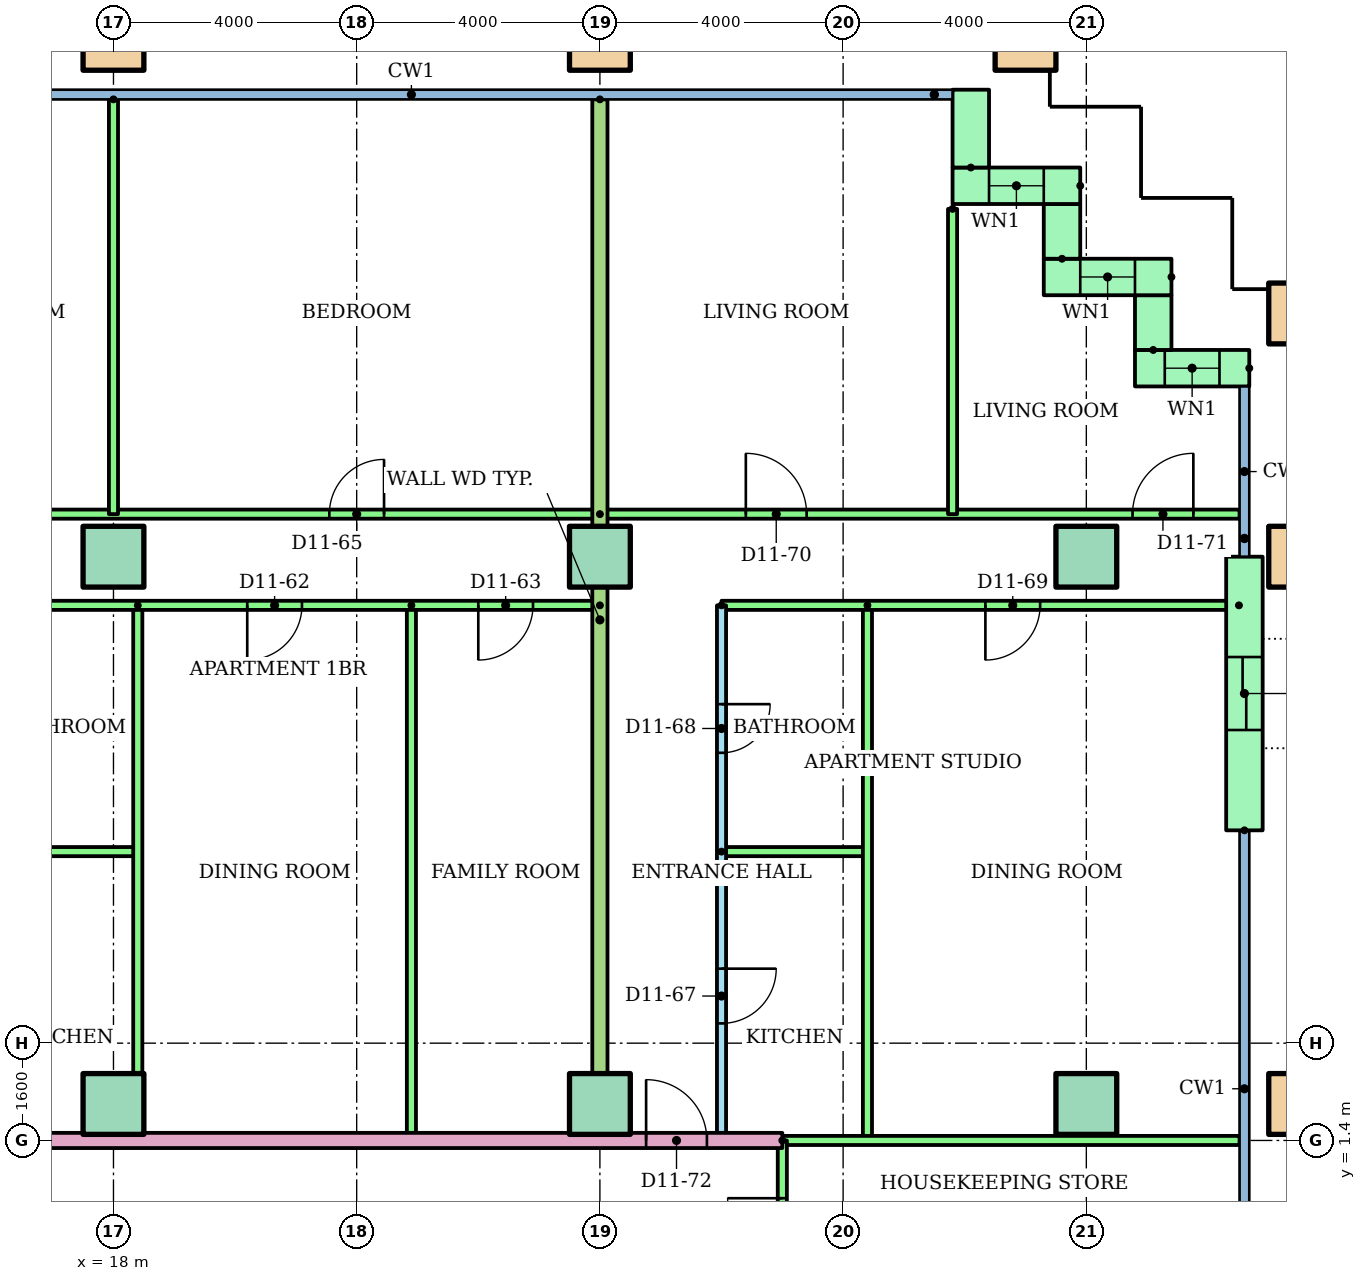
"""IFC4 building model, lengths in metres.
Left out: names, types, materials, properties, quantities, classifications, styles, units other than length and angle.
Written with IfcOpenShell. Run it as: python <this file> out.ifc"""

import sys

from ifc_helpers import new_model, si_unit, direction, frame, frame_2d, origin, origin_2d, place, context, subcontext, project, spatial, rectangle, hollow_rectangle, extrude, element, fill, save


model = new_model("IFC4")
c1 = context("Model", 3, precision=1e-05, world=origin(), true_north=direction((0.0, 1.0)))
c2 = subcontext(c1, "Body", "Model", "MODEL_VIEW")
j1 = project(units=[si_unit("LENGTHUNIT", "METRE"), si_unit("PLANEANGLEUNIT", "RADIAN")], contexts=[c1])
p1 = place(None, origin())
s1 = spatial("IfcSite", under=j1, at=p1, CompositionType="ELEMENT")
p2 = place(p1, origin())
s2 = spatial("IfcBuilding", under=s1, at=p2, CompositionType="ELEMENT")
p3 = place(p2, frame((0.0, 0.0, 44.8)))
s3 = spatial("IfcBuildingStorey", under=s2, at=p3, CompositionType="ELEMENT", Elevation=44.8)
for number, where in (
    (1, (18.0, 2.0, 0.0)),
    (2, (26.0, 2.0, 0.0)),
    (3, (34.0, 2.0, 0.0)),
):
    element("IfcColumn", number, at=place(p3, frame(where)), inside=s3, PredefinedType="COLUMN", context=c2, shape_type="SweptSolid", body=[
        extrude(rectangle(XDim=1.0, YDim=1.0, at=origin_2d()), origin(), (0.0, 0.0, 1.0), 3.2),
    ])
p4 = place(p3, frame((37.5, 2.0, 0.0)))
e4 = element("IfcColumn", 4, at=p4, inside=s3, PredefinedType="COLUMN", context=c2, shape_type="SweptSolid", body=[
    extrude(hollow_rectangle(XDim=1.0, YDim=1.0, WallThickness=0.05, at=origin_2d()), origin(), (0.0, 0.0, 1.0), 3.2),
])
for number, where in (
    (5, (18.0, 11.0, 0.0)),
    (6, (26.0, 11.0, 0.0)),
    (7, (34.0, 11.0, 0.0)),
):
    element("IfcColumn", number, at=place(p3, frame(where)), inside=s3, PredefinedType="COLUMN", context=c2, shape_type="SweptSolid", body=[
        extrude(rectangle(XDim=1.0, YDim=1.0, at=origin_2d()), origin(), (0.0, 0.0, 1.0), 3.2),
    ])
for number, where in (
    (8, (37.5, 11.0, 0.0)),
    (9, (37.5, 15.0, 0.0)),
    (10, (18.0, 19.5, 0.0)),
    (11, (26.0, 19.5, 0.0)),
    (12, (33.0, 19.5, 0.0)),
):
    element("IfcColumn", number, at=place(p3, frame(where)), inside=s3, PredefinedType="COLUMN", context=c2, shape_type="SweptSolid", body=[
        extrude(hollow_rectangle(XDim=1.0, YDim=1.0, WallThickness=0.05, at=origin_2d()), origin(), (0.0, 0.0, 1.0), 3.2),
    ])
p5 = place(p3, frame((36.68, 14.1, 0.0), z_axis=(0.0, 0.0, 1.0), x_axis=(-1.0, 0.0, 0.0)))
e13 = element("IfcWall", 13, at=p5, inside=s3, PredefinedType="STANDARD", context=c2, shape_type="SweptSolid", body=[
    extrude(rectangle(XDim=1.88, YDim=0.6, at=frame_2d((0.94, 0.0))), origin(), (0.0, 0.0, 1.0), 2.92),
])
p6 = place(p5, frame((0.49, 0.0, 0.9)))
e14 = element("IfcOpeningElement", 14, at=p6, cuts=e13, PredefinedType="OPENING", context=c2, shape_type="SweptSolid", body=[
    extrude(rectangle(XDim=0.9, YDim=1.5, at=frame_2d((0.45, 0.75))), frame((0.0, 0.31, 0.0), z_axis=(0.0, -1.0, 0.0), x_axis=(1.0, 0.0, 0.0)), (0.0, 0.0, 1.0), 0.62),
])
p7 = place(p3, frame((35.1, 14.4, 0.0), z_axis=(0.0, 0.0, 1.0), x_axis=(0.0, 1.0, 0.0)))
e15 = element("IfcWall", 15, at=p7, inside=s3, PredefinedType="STANDARD", context=c2, shape_type="SweptSolid", body=[
    extrude(rectangle(XDim=0.9, YDim=0.6, at=frame_2d((0.45, 0.0))), origin(), (0.0, 0.0, 1.0), 2.92),
])
p8 = place(p3, frame((35.4, 15.6, 0.0), z_axis=(0.0, 0.0, 1.0), x_axis=(-1.0, 0.0, 0.0)))
e16 = element("IfcWall", 16, at=p8, inside=s3, PredefinedType="STANDARD", context=c2, shape_type="SweptSolid", body=[
    extrude(rectangle(XDim=2.1, YDim=0.6, at=frame_2d((1.05, 0.0))), origin(), (0.0, 0.0, 1.0), 2.92),
])
p9 = place(p8, frame((0.6, 0.0, 0.9)))
e17 = element("IfcOpeningElement", 17, at=p9, cuts=e16, PredefinedType="OPENING", context=c2, shape_type="SweptSolid", body=[
    extrude(rectangle(XDim=0.9, YDim=1.5, at=frame_2d((0.45, 0.75))), frame((0.0, 0.31, 0.0), z_axis=(0.0, -1.0, 0.0), x_axis=(1.0, 0.0, 0.0)), (0.0, 0.0, 1.0), 0.62),
])
p10 = place(p3, frame((33.6, 15.9, 0.0), z_axis=(0.0, 0.0, 1.0), x_axis=(0.0, 1.0, 0.0)))
e18 = element("IfcWall", 18, at=p10, inside=s3, PredefinedType="STANDARD", context=c2, shape_type="SweptSolid", body=[
    extrude(rectangle(XDim=0.9, YDim=0.6, at=frame_2d((0.45, 0.0))), origin(), (0.0, 0.0, 1.0), 2.92),
])
p11 = place(p3, frame((33.9, 17.1, 0.0), z_axis=(0.0, 0.0, 1.0), x_axis=(-1.0, 0.0, 0.0)))
e19 = element("IfcWall", 19, at=p11, inside=s3, PredefinedType="STANDARD", context=c2, shape_type="SweptSolid", body=[
    extrude(rectangle(XDim=2.1, YDim=0.6, at=frame_2d((1.05, 0.0))), origin(), (0.0, 0.0, 1.0), 2.92),
])
p12 = place(p11, frame((0.6, 0.0, 0.9)))
e20 = element("IfcOpeningElement", 20, at=p12, cuts=e19, PredefinedType="OPENING", context=c2, shape_type="SweptSolid", body=[
    extrude(rectangle(XDim=0.9, YDim=1.5, at=frame_2d((0.45, 0.75))), frame((0.0, 0.31, 0.0), z_axis=(0.0, -1.0, 0.0), x_axis=(1.0, 0.0, 0.0)), (0.0, 0.0, 1.0), 0.62),
])
p13 = place(p3, frame((32.1, 17.4, 0.0), z_axis=(0.0, 0.0, 1.0), x_axis=(0.0, 1.0, 0.0)))
e21 = element("IfcWall", 21, at=p13, inside=s3, PredefinedType="STANDARD", context=c2, shape_type="SweptSolid", body=[
    extrude(rectangle(XDim=1.28, YDim=0.6, at=frame_2d((0.64, 0.0))), origin(), (0.0, 0.0, 1.0), 2.92),
])
p14 = place(p3, frame((36.6, 6.5, 0.0), z_axis=(0.0, 0.0, 1.0), x_axis=(0.0, 1.0, 0.0)))
e22 = element("IfcWall", 22, at=p14, inside=s3, PredefinedType="STANDARD", context=c2, shape_type="SweptSolid", body=[
    extrude(rectangle(XDim=4.5, YDim=0.6, at=frame_2d((2.25, 0.0))), origin(), (0.0, 0.0, 1.0), 2.92),
])
p15 = place(p14, frame((1.65, 0.0, 0.0)))
e23 = element("IfcOpeningElement", 23, at=p15, cuts=e22, PredefinedType="OPENING", context=c2, shape_type="SweptSolid", body=[
    extrude(rectangle(XDim=1.2, YDim=2.1, at=frame_2d((0.6, 1.05))), frame((0.0, 0.31, 0.0), z_axis=(0.0, -1.0, 0.0), x_axis=(1.0, 0.0, 0.0)), (0.0, 0.0, 1.0), 0.62),
])
p16 = place(p3, frame((16.0, 6.15, 0.0)))
e24 = element("IfcWall", 24, at=p16, inside=s3, PredefinedType="PARTITIONING", context=c2, shape_type="SweptSolid", body=[
    extrude(rectangle(XDim=2.4, YDim=0.15, at=frame_2d((1.2, 0.0))), origin(), (0.0, 0.0, 1.0), 2.4),
])
for number, where, z_axis, x_axis in (
    (25, (18.4, 10.2, 0.0), (0.0, 0.0, 1.0), (0.0, -1.0, 0.0)),
    (26, (22.9, 10.2, 0.0), (0.0, 0.0, 1.0), (0.0, -1.0, 0.0)),
):
    element("IfcWall", number, at=place(p3, frame(where, z_axis=z_axis, x_axis=x_axis)), inside=s3, PredefinedType="PARTITIONING", context=c2, shape_type="SweptSolid", body=[
        extrude(rectangle(XDim=8.8, YDim=0.15, at=frame_2d((4.4, 0.0))), origin(), (0.0, 0.0, 1.0), 2.4),
    ])
p17 = place(p3, frame((26.0, 10.2, 0.0), z_axis=(0.0, 0.0, 1.0), x_axis=(-1.0, 0.0, 0.0)))
e27 = element("IfcWall", 27, at=p17, inside=s3, PredefinedType="PARTITIONING", context=c2, shape_type="SweptSolid", body=[
    extrude(rectangle(XDim=10.0, YDim=0.15, at=frame_2d((5.0, 0.0))), origin(), (0.0, 0.0, 1.0), 2.4),
])
p18 = place(p17, frame((4.9, 0.0, 0.0)))
e28 = element("IfcOpeningElement", 28, at=p18, cuts=e27, PredefinedType="OPENING", context=c2, shape_type="SweptSolid", body=[
    extrude(rectangle(XDim=0.9, YDim=2.1, at=frame_2d((0.45, 1.05))), frame((0.0, 0.085, 0.0), z_axis=(0.0, -1.0, 0.0), x_axis=(1.0, 0.0, 0.0)), (0.0, 0.0, 1.0), 0.17),
])
p19 = place(p17, frame((1.1, 0.0, 0.0)))
e29 = element("IfcOpeningElement", 29, at=p19, cuts=e27, PredefinedType="OPENING", context=c2, shape_type="SweptSolid", body=[
    extrude(rectangle(XDim=0.9, YDim=2.1, at=frame_2d((0.45, 1.05))), frame((0.0, 0.085, 0.0), z_axis=(0.0, -1.0, 0.0), x_axis=(1.0, 0.0, 0.0)), (0.0, 0.0, 1.0), 0.17),
])
p20 = place(p3, frame((14.0, 11.7, 0.0)))
e30 = element("IfcWall", 30, at=p20, inside=s3, PredefinedType="PARTITIONING", context=c2, shape_type="SweptSolid", body=[
    extrude(rectangle(XDim=12.0, YDim=0.15, at=frame_2d((6.0, 0.0))), origin(), (0.0, 0.0, 1.0), 2.4),
])
p21 = place(p20, frame((1.5, 0.0, 0.0)))
e31 = element("IfcOpeningElement", 31, at=p21, cuts=e30, PredefinedType="OPENING", context=c2, shape_type="SweptSolid", body=[
    extrude(rectangle(XDim=1.0, YDim=2.1, at=frame_2d((0.5, 1.05))), frame((0.0, 0.085, 0.0), z_axis=(0.0, -1.0, 0.0), x_axis=(1.0, 0.0, 0.0)), (0.0, 0.0, 1.0), 0.17),
])
p22 = place(p20, frame((7.55, 0.0, 0.0)))
e32 = element("IfcOpeningElement", 32, at=p22, cuts=e30, PredefinedType="OPENING", context=c2, shape_type="SweptSolid", body=[
    extrude(rectangle(XDim=0.9, YDim=2.1, at=frame_2d((0.45, 1.05))), frame((0.0, 0.085, 0.0), z_axis=(0.0, -1.0, 0.0), x_axis=(1.0, 0.0, 0.0)), (0.0, 0.0, 1.0), 0.17),
])
p23 = place(p3, frame((18.0, 18.521, 0.0), z_axis=(0.0, 0.0, 1.0), x_axis=(0.0, -1.0, 0.0)))
e33 = element("IfcWall", 33, at=p23, inside=s3, PredefinedType="PARTITIONING", context=c2, shape_type="SweptSolid", body=[
    extrude(rectangle(XDim=6.821, YDim=0.15, at=frame_2d((3.411, 0.0))), origin(), (0.0, 0.0, 1.0), 2.4),
])
p24 = place(p3, frame((28.0, 10.2, 0.0), z_axis=(0.0, 0.0, 1.0), x_axis=(0.0, -1.0, 0.0)))
e34 = element("IfcWall", 34, at=p24, inside=s3, PredefinedType="PARTITIONING", context=c2, shape_type="SweptSolid", body=[
    extrude(rectangle(XDim=8.8, YDim=0.15, at=frame_2d((4.4, 0.0))), origin(), (0.0, 0.0, 1.0), 2.4),
])
p25 = place(p24, frame((5.975, 0.0, 0.0)))
e35 = element("IfcOpeningElement", 35, at=p25, cuts=e34, PredefinedType="OPENING", context=c2, shape_type="SweptSolid", body=[
    extrude(rectangle(XDim=0.9, YDim=2.1, at=frame_2d((0.45, 1.05))), frame((0.0, 0.085, 0.0), z_axis=(0.0, -1.0, 0.0), x_axis=(1.0, 0.0, 0.0)), (0.0, 0.0, 1.0), 0.17),
])
p26 = place(p24, frame((1.625, 0.0, 0.0)))
e36 = element("IfcOpeningElement", 36, at=p26, cuts=e34, PredefinedType="OPENING", context=c2, shape_type="SweptSolid", body=[
    extrude(rectangle(XDim=0.8, YDim=2.1, at=frame_2d((0.4, 1.05))), frame((0.0, 0.085, 0.0), z_axis=(0.0, -1.0, 0.0), x_axis=(1.0, 0.0, 0.0)), (0.0, 0.0, 1.0), 0.17),
])
p27 = place(p3, frame((28.0, 6.15, 0.0)))
e37 = element("IfcWall", 37, at=p27, inside=s3, PredefinedType="PARTITIONING", context=c2, shape_type="SweptSolid", body=[
    extrude(rectangle(XDim=2.4, YDim=0.15, at=frame_2d((1.2, 0.0))), origin(), (0.0, 0.0, 1.0), 2.4),
])
p28 = place(p3, frame((30.4, 10.2, 0.0), z_axis=(0.0, 0.0, 1.0), x_axis=(0.0, -1.0, 0.0)))
e38 = element("IfcWall", 38, at=p28, inside=s3, PredefinedType="PARTITIONING", context=c2, shape_type="SweptSolid", body=[
    extrude(rectangle(XDim=8.8, YDim=0.15, at=frame_2d((4.4, 0.0))), origin(), (0.0, 0.0, 1.0), 2.4),
])
p29 = place(p3, frame((36.51, 10.2, 0.0), z_axis=(0.0, 0.0, 1.0), x_axis=(-1.0, 0.0, 0.0)))
e39 = element("IfcWall", 39, at=p29, inside=s3, PredefinedType="PARTITIONING", context=c2, shape_type="SweptSolid", body=[
    extrude(rectangle(XDim=8.51, YDim=0.15, at=frame_2d((4.255, 0.0))), origin(), (0.0, 0.0, 1.0), 2.4),
])
p30 = place(p29, frame((3.27, 0.0, 0.0)))
e40 = element("IfcOpeningElement", 40, at=p30, cuts=e39, PredefinedType="OPENING", context=c2, shape_type="SweptSolid", body=[
    extrude(rectangle(XDim=0.9, YDim=2.1, at=frame_2d((0.45, 1.05))), frame((0.0, 0.085, 0.0), z_axis=(0.0, -1.0, 0.0), x_axis=(1.0, 0.0, 0.0)), (0.0, 0.0, 1.0), 0.17),
])
p31 = place(p3, frame((26.0, 11.7, 0.0)))
e41 = element("IfcWall", 41, at=p31, inside=s3, PredefinedType="PARTITIONING", context=c2, shape_type="SweptSolid", body=[
    extrude(rectangle(XDim=10.52, YDim=0.15, at=frame_2d((5.26, 0.0))), origin(), (0.0, 0.0, 1.0), 2.4),
])
p32 = place(p31, frame((2.4, 0.0, 0.0)))
e42 = element("IfcOpeningElement", 42, at=p32, cuts=e41, PredefinedType="OPENING", context=c2, shape_type="SweptSolid", body=[
    extrude(rectangle(XDim=1.0, YDim=2.1, at=frame_2d((0.5, 1.05))), frame((0.0, 0.085, 0.0), z_axis=(0.0, -1.0, 0.0), x_axis=(1.0, 0.0, 0.0)), (0.0, 0.0, 1.0), 0.17),
])
p33 = place(p31, frame((8.76, 0.0, 0.0)))
e43 = element("IfcOpeningElement", 43, at=p33, cuts=e41, PredefinedType="OPENING", context=c2, shape_type="SweptSolid", body=[
    extrude(rectangle(XDim=1.0, YDim=2.1, at=frame_2d((0.5, 1.05))), frame((0.0, 0.085, 0.0), z_axis=(0.0, -1.0, 0.0), x_axis=(1.0, 0.0, 0.0)), (0.0, 0.0, 1.0), 0.17),
])
p34 = place(p3, frame((31.8, 16.72, 0.0), z_axis=(0.0, 0.0, 1.0), x_axis=(0.0, -1.0, 0.0)))
e44 = element("IfcWall", 44, at=p34, inside=s3, PredefinedType="PARTITIONING", context=c2, shape_type="SweptSolid", body=[
    extrude(rectangle(XDim=5.02, YDim=0.15, at=frame_2d((2.51, 0.0))), origin(), (0.0, 0.0, 1.0), 2.4),
])
p35 = place(p3, frame((26.0, 18.521, 0.0), z_axis=(0.0, 0.0, 1.0), x_axis=(0.0, -1.0, 0.0)))
e45 = element("IfcWall", 45, at=p35, inside=s3, PredefinedType="PARTITIONING", context=c2, shape_type="SweptSolid", body=[
    extrude(rectangle(XDim=17.121, YDim=0.25, at=frame_2d((8.561, 0.0))), origin(), (0.0, 0.0, 1.0), 2.4),
])
p36 = place(p3, frame((14.0, 1.4, 0.0)))
e46 = element("IfcWall", 46, at=p36, inside=s3, PredefinedType="PARTITIONING", context=c2, shape_type="SweptSolid", body=[
    extrude(rectangle(XDim=15.0, YDim=0.25, at=frame_2d((7.5, 0.0))), origin(), (0.0, 0.0, 1.0), 2.4),
])
p37 = place(p36, frame((0.5, 0.0, 0.0)))
e47 = element("IfcOpeningElement", 47, at=p37, cuts=e46, PredefinedType="OPENING", context=c2, shape_type="SweptSolid", body=[
    extrude(rectangle(XDim=1.0, YDim=2.1, at=frame_2d((0.5, 1.05))), frame((0.0, 0.135, 0.0), z_axis=(0.0, -1.0, 0.0), x_axis=(1.0, 0.0, 0.0)), (0.0, 0.0, 1.0), 0.27),
])
p38 = place(p36, frame((12.76, 0.0, 0.0)))
e48 = element("IfcOpeningElement", 48, at=p38, cuts=e46, PredefinedType="OPENING", context=c2, shape_type="SweptSolid", body=[
    extrude(rectangle(XDim=1.0, YDim=2.1, at=frame_2d((0.5, 1.05))), frame((0.0, 0.135, 0.0), z_axis=(0.0, -1.0, 0.0), x_axis=(1.0, 0.0, 0.0)), (0.0, 0.0, 1.0), 0.27),
])
p39 = place(p3, frame((29.0, 1.4, 0.0)))
e49 = element("IfcWall", 49, at=p39, inside=s3, PredefinedType="PARTITIONING", context=c2, shape_type="SweptSolid", body=[
    extrude(rectangle(XDim=7.52, YDim=0.15, at=frame_2d((3.76, 0.0))), origin(), (0.0, 0.0, 1.0), 2.4),
])
p40 = place(p3, frame((29.0, -1.4, 0.0), z_axis=(0.0, 0.0, 1.0), x_axis=(0.0, 1.0, 0.0)))
e50 = element("IfcWall", 50, at=p40, inside=s3, PredefinedType="PARTITIONING", context=c2, shape_type="SweptSolid", body=[
    extrude(rectangle(XDim=2.8, YDim=0.15, at=frame_2d((1.4, 0.0))), origin(), (0.0, 0.0, 1.0), 2.4),
])
p41 = place(p40, frame((0.95, 0.0, 0.0)))
e51 = element("IfcOpeningElement", 51, at=p41, cuts=e50, PredefinedType="OPENING", context=c2, shape_type="SweptSolid", body=[
    extrude(rectangle(XDim=0.9, YDim=2.1, at=frame_2d((0.45, 1.05))), frame((0.0, 0.085, 0.0), z_axis=(0.0, -1.0, 0.0), x_axis=(1.0, 0.0, 0.0)), (0.0, 0.0, 1.0), 0.17),
])
p42 = place(p6, origin())
e52 = element("IfcWindow", 52, at=p42, inside=s3, PartitioningType="SINGLE_PANEL", PredefinedType="WINDOW", context=c2, shape_type="SweptSolid", body=[
    extrude(rectangle(XDim=0.9, YDim=1.5, at=frame_2d((0.45, 0.75))), frame((0.0, 0.03, 0.0), z_axis=(0.0, -1.0, 0.0), x_axis=(1.0, 0.0, 0.0)), (0.0, 0.0, 1.0), 0.06),
])
fill(e14, e52)
p43 = place(p9, origin())
e53 = element("IfcWindow", 53, at=p43, inside=s3, PartitioningType="SINGLE_PANEL", PredefinedType="WINDOW", context=c2, shape_type="SweptSolid", body=[
    extrude(rectangle(XDim=0.9, YDim=1.5, at=frame_2d((0.45, 0.75))), frame((0.0, 0.03, 0.0), z_axis=(0.0, -1.0, 0.0), x_axis=(1.0, 0.0, 0.0)), (0.0, 0.0, 1.0), 0.06),
])
fill(e17, e53)
p44 = place(p12, origin())
e54 = element("IfcWindow", 54, at=p44, inside=s3, PartitioningType="SINGLE_PANEL", PredefinedType="WINDOW", context=c2, shape_type="SweptSolid", body=[
    extrude(rectangle(XDim=0.9, YDim=1.5, at=frame_2d((0.45, 0.75))), frame((0.0, 0.03, 0.0), z_axis=(0.0, -1.0, 0.0), x_axis=(1.0, 0.0, 0.0)), (0.0, 0.0, 1.0), 0.06),
])
fill(e20, e54)
p45 = place(p18, origin())
e55 = element("IfcDoor", 55, at=p45, inside=s3, OperationType="SINGLE_SWING_RIGHT", PredefinedType="DOOR", context=c2, shape_type="SweptSolid", body=[
    extrude(rectangle(XDim=0.9, YDim=2.1, at=frame_2d((0.45, 1.05))), frame((0.0, 0.025, 0.0), z_axis=(0.0, -1.0, 0.0), x_axis=(1.0, 0.0, 0.0)), (0.0, 0.0, 1.0), 0.05),
])
fill(e28, e55)
p46 = place(p19, origin())
e56 = element("IfcDoor", 56, at=p46, inside=s3, OperationType="SINGLE_SWING_RIGHT", PredefinedType="DOOR", context=c2, shape_type="SweptSolid", body=[
    extrude(rectangle(XDim=0.9, YDim=2.1, at=frame_2d((0.45, 1.05))), frame((0.0, 0.025, 0.0), z_axis=(0.0, -1.0, 0.0), x_axis=(1.0, 0.0, 0.0)), (0.0, 0.0, 1.0), 0.05),
])
fill(e29, e56)
p47 = place(p22, origin())
e57 = element("IfcDoor", 57, at=p47, inside=s3, OperationType="SINGLE_SWING_RIGHT", PredefinedType="DOOR", context=c2, shape_type="SweptSolid", body=[
    extrude(rectangle(XDim=0.9, YDim=2.1, at=frame_2d((0.45, 1.05))), frame((0.0, 0.025, 0.0), z_axis=(0.0, -1.0, 0.0), x_axis=(1.0, 0.0, 0.0)), (0.0, 0.0, 1.0), 0.05),
])
fill(e32, e57)
p48 = place(p25, origin())
e58 = element("IfcDoor", 58, at=p48, inside=s3, OperationType="SINGLE_SWING_LEFT", PredefinedType="DOOR", context=c2, shape_type="SweptSolid", body=[
    extrude(rectangle(XDim=0.9, YDim=2.1, at=frame_2d((0.45, 1.05))), frame((0.0, 0.025, 0.0), z_axis=(0.0, -1.0, 0.0), x_axis=(1.0, 0.0, 0.0)), (0.0, 0.0, 1.0), 0.05),
])
fill(e35, e58)
p49 = place(p26, origin())
e59 = element("IfcDoor", 59, at=p49, inside=s3, OperationType="SINGLE_SWING_LEFT", PredefinedType="DOOR", context=c2, shape_type="SweptSolid", body=[
    extrude(rectangle(XDim=0.8, YDim=2.1, at=frame_2d((0.4, 1.05))), frame((0.0, 0.025, 0.0), z_axis=(0.0, -1.0, 0.0), x_axis=(1.0, 0.0, 0.0)), (0.0, 0.0, 1.0), 0.05),
])
fill(e36, e59)
p50 = place(p30, origin())
e60 = element("IfcDoor", 60, at=p50, inside=s3, OperationType="SINGLE_SWING_RIGHT", PredefinedType="DOOR", context=c2, shape_type="SweptSolid", body=[
    extrude(rectangle(XDim=0.9, YDim=2.1, at=frame_2d((0.45, 1.05))), frame((0.0, 0.025, 0.0), z_axis=(0.0, -1.0, 0.0), x_axis=(1.0, 0.0, 0.0)), (0.0, 0.0, 1.0), 0.05),
])
fill(e40, e60)
p51 = place(p32, origin())
e61 = element("IfcDoor", 61, at=p51, inside=s3, OperationType="SINGLE_SWING_LEFT", PredefinedType="DOOR", context=c2, shape_type="SweptSolid", body=[
    extrude(rectangle(XDim=1.0, YDim=2.1, at=frame_2d((0.5, 1.05))), frame((0.0, 0.025, 0.0), z_axis=(0.0, -1.0, 0.0), x_axis=(1.0, 0.0, 0.0)), (0.0, 0.0, 1.0), 0.05),
])
fill(e42, e61)
p52 = place(p33, origin())
e62 = element("IfcDoor", 62, at=p52, inside=s3, OperationType="SINGLE_SWING_RIGHT", PredefinedType="DOOR", context=c2, shape_type="SweptSolid", body=[
    extrude(rectangle(XDim=1.0, YDim=2.1, at=frame_2d((0.5, 1.05))), frame((0.0, 0.025, 0.0), z_axis=(0.0, -1.0, 0.0), x_axis=(1.0, 0.0, 0.0)), (0.0, 0.0, 1.0), 0.05),
])
fill(e43, e62)
p53 = place(p38, origin())
e63 = element("IfcDoor", 63, at=p53, inside=s3, OperationType="SINGLE_SWING_LEFT", PredefinedType="DOOR", context=c2, shape_type="SweptSolid", body=[
    extrude(rectangle(XDim=1.0, YDim=2.1, at=frame_2d((0.5, 1.05))), frame((0.0, 0.025, 0.0), z_axis=(0.0, -1.0, 0.0), x_axis=(1.0, 0.0, 0.0)), (0.0, 0.0, 1.0), 0.05),
])
fill(e48, e63)
p54 = place(p41, origin())
e64 = element("IfcDoor", 64, at=p54, inside=s3, OperationType="SINGLE_SWING_RIGHT", PredefinedType="DOOR", context=c2, shape_type="SweptSolid", body=[
    extrude(rectangle(XDim=0.9, YDim=2.1, at=frame_2d((0.45, 1.05))), frame((0.0, 0.025, 0.0), z_axis=(0.0, -1.0, 0.0), x_axis=(1.0, 0.0, 0.0)), (0.0, 0.0, 1.0), 0.05),
])
fill(e51, e64)
p55 = place(p15, origin())
e65 = element("IfcDoor", 65, at=p55, inside=s3, OperationType="SLIDING_TO_LEFT", PredefinedType="DOOR", context=c2, shape_type="SweptSolid", body=[
    extrude(rectangle(XDim=1.2, YDim=2.1, at=frame_2d((0.6, 1.05))), frame((0.0, 0.025, 0.0), z_axis=(0.0, -1.0, 0.0), x_axis=(1.0, 0.0, 0.0)), (0.0, 0.0, 1.0), 0.05),
])
fill(e23, e65)
save(model, sys.argv[1])
